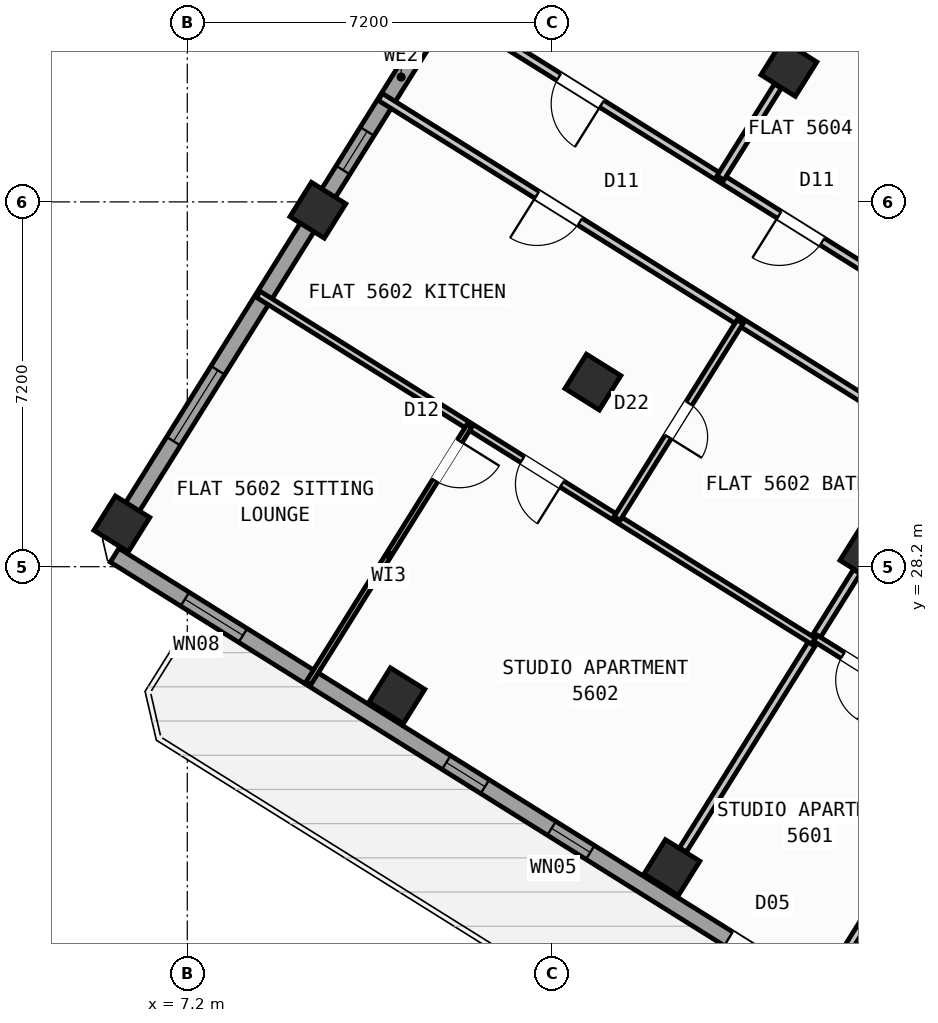
"""IFC4 building model, lengths in metres.
Left out: names, types, materials, properties, quantities, classifications, styles, units other than length and angle.
Written with IfcOpenShell. Run it as: python <this file> out.ifc"""

import sys

from ifc_helpers import new_model, si_unit, direction, frame, frame_2d, origin, origin_2d, place, context, subcontext, project, spatial, rectangle, hollow_rectangle, extrude, source, transform, mapped, element, fill, save


model = new_model("IFC4")
c1 = context("Model", 3, precision=1e-05, world=origin(), true_north=direction((0.0, 1.0)))
c2 = subcontext(c1, "Body", "Model", "MODEL_VIEW")
j1 = project(units=[si_unit("LENGTHUNIT", "METRE"), si_unit("PLANEANGLEUNIT", "RADIAN")], contexts=[c1])
p1 = place(None, origin())
s1 = spatial("IfcSite", under=j1, at=p1, CompositionType="ELEMENT")
p2 = place(p1, origin())
s2 = spatial("IfcBuilding", under=s1, at=p2, CompositionType="ELEMENT")
p3 = place(p2, frame((0.0, 0.0, 222.0)))
s3 = spatial("IfcBuildingStorey", under=s2, at=p3, CompositionType="ELEMENT", Elevation=222.0)
m1 = source(origin(), c2, "Body", "SweptSolid", [
    extrude(hollow_rectangle(XDim=0.8, YDim=0.8, WallThickness=0.032, at=origin_2d()), origin(), (0.0, 0.0, 1.0), 3.6),
])
for number, where, z_axis, x_axis in (
    (1, (20.632, 28.452, 0.0), (0.0, 0.0, 1.0), (-0.848, 0.53, 0.0)),
    (2, (16.764, 22.261, 0.0), (0.0, 0.0, 1.0), (-0.848, 0.53, 0.0)),
    (3, (19.073, 38.034, 0.0), (0.0, 0.0, 1.0), (-0.848, 0.53, 0.0)),
    (4, (15.205, 31.844, 0.0), (0.0, 0.0, 1.0), (-0.848, 0.53, 0.0)),
    (5, (11.336, 25.653, 0.0), (0.0, 0.0, 1.0), (-0.848, 0.53, 0.0)),
    (6, (9.777, 35.235, 0.0), (0.0, 0.0, 1.0), (-0.848, 0.53, 0.0)),
    (7, (5.909, 29.044, 0.0), (0.0, 0.0, 1.0), (-0.848, 0.53, 0.0)),
):
    element("IfcColumn", number, at=place(p3, frame(where, z_axis=z_axis, x_axis=x_axis)), inside=s3, PredefinedType="COLUMN", context=c2, shape_type="MappedRepresentation", body=[
        mapped(m1, transform((0.0, 0.0, 0.0), scale=1.0)),
    ])
p4 = place(p3, frame((31.76, 12.183, 0.0), z_axis=(0.0, 0.0, 1.0), x_axis=(-0.848047074256, 0.529920899612, 0.0)))
e8 = element("IfcWall", 8, at=p4, inside=s3, PredefinedType="STANDARD", context=c2, shape_type="SweptSolid", body=[
    extrude(rectangle(XDim=30.652, YDim=0.32, at=frame_2d((15.326, 0.0))), origin(), (0.0, 0.0, 1.0), 3.35),
])
p5 = place(p4, frame((15.166, 0.0, 0.0)))
e9 = element("IfcOpeningElement", 9, at=p5, cuts=e8, PredefinedType="OPENING", context=c2, shape_type="SweptSolid", body=[
    extrude(rectangle(XDim=1.2, YDim=2.15, at=frame_2d((0.6, 1.075))), frame((0.0, 0.17, 0.0), z_axis=(0.0, -1.0, 0.0), x_axis=(1.0, 0.0, 0.0)), (0.0, 0.0, 1.0), 0.34),
])
p6 = place(p4, frame((2.24, 0.0, 0.9)))
e10 = element("IfcOpeningElement", 10, at=p6, cuts=e8, PredefinedType="OPENING", context=c2, shape_type="SweptSolid", body=[
    extrude(rectangle(XDim=1.65, YDim=1.45, at=frame_2d((0.825, 0.725))), frame((0.0, 0.17, 0.0), z_axis=(0.0, -1.0, 0.0), x_axis=(1.0, 0.0, 0.0)), (0.0, 0.0, 1.0), 0.34),
])
p7 = place(p4, frame((7.469, 0.0, 0.9)))
e11 = element("IfcOpeningElement", 11, at=p7, cuts=e8, PredefinedType="OPENING", context=c2, shape_type="SweptSolid", body=[
    extrude(rectangle(XDim=1.65, YDim=1.45, at=frame_2d((0.825, 0.725))), frame((0.0, 0.17, 0.0), z_axis=(0.0, -1.0, 0.0), x_axis=(1.0, 0.0, 0.0)), (0.0, 0.0, 1.0), 0.34),
])
p8 = place(p4, frame((12.623, 0.0, 1.0)))
e12 = element("IfcOpeningElement", 12, at=p8, cuts=e8, PredefinedType="OPENING", context=c2, shape_type="SweptSolid", body=[
    extrude(rectangle(XDim=0.9, YDim=1.25, at=frame_2d((0.45, 0.625))), frame((0.0, 0.17, 0.0), z_axis=(0.0, -1.0, 0.0), x_axis=(1.0, 0.0, 0.0)), (0.0, 0.0, 1.0), 0.34),
])
p9 = place(p4, frame((19.583, 0.0, 1.0)))
e13 = element("IfcOpeningElement", 13, at=p9, cuts=e8, PredefinedType="OPENING", context=c2, shape_type="SweptSolid", body=[
    extrude(rectangle(XDim=0.9, YDim=1.25, at=frame_2d((0.45, 0.625))), frame((0.0, 0.17, 0.0), z_axis=(0.0, -1.0, 0.0), x_axis=(1.0, 0.0, 0.0)), (0.0, 0.0, 1.0), 0.34),
])
p10 = place(p4, frame((22.033, 0.0, 1.0)))
e14 = element("IfcOpeningElement", 14, at=p10, cuts=e8, PredefinedType="OPENING", context=c2, shape_type="SweptSolid", body=[
    extrude(rectangle(XDim=0.9, YDim=1.25, at=frame_2d((0.45, 0.625))), frame((0.0, 0.17, 0.0), z_axis=(0.0, -1.0, 0.0), x_axis=(1.0, 0.0, 0.0)), (0.0, 0.0, 1.0), 0.34),
])
p11 = place(p4, frame((27.666, 0.0, 0.9)))
e15 = element("IfcOpeningElement", 15, at=p11, cuts=e8, PredefinedType="OPENING", context=c2, shape_type="SweptSolid", body=[
    extrude(rectangle(XDim=1.35, YDim=1.45, at=frame_2d((0.675, 0.725))), frame((0.0, 0.17, 0.0), z_axis=(0.0, -1.0, 0.0), x_axis=(1.0, 0.0, 0.0)), (0.0, 0.0, 1.0), 0.34),
])
p12 = place(p3, frame((5.7, 28.71, 0.0), z_axis=(0.0, 0.0, 1.0), x_axis=(0.529923711467, 0.8480453172, 0.0)))
e16 = element("IfcWall", 16, at=p12, inside=s3, PredefinedType="STANDARD", context=c2, shape_type="SweptSolid", body=[
    extrude(rectangle(XDim=21.587, YDim=0.32, at=frame_2d((10.794, 0.0))), origin(), (0.0, 0.0, 1.0), 2.825),
])
p13 = place(p12, frame((2.319, 0.0, 0.9)))
e17 = element("IfcOpeningElement", 17, at=p13, cuts=e16, PredefinedType="OPENING", context=c2, shape_type="SweptSolid", body=[
    extrude(rectangle(XDim=1.65, YDim=1.45, at=frame_2d((0.825, 0.725))), frame((0.0, 0.17, 0.0), z_axis=(0.0, -1.0, 0.0), x_axis=(1.0, 0.0, 0.0)), (0.0, 0.0, 1.0), 0.34),
])
p14 = place(p12, frame((8.629, 0.0, 1.0)))
e18 = element("IfcOpeningElement", 18, at=p14, cuts=e16, PredefinedType="OPENING", context=c2, shape_type="SweptSolid", body=[
    extrude(rectangle(XDim=0.9, YDim=1.25, at=frame_2d((0.45, 0.625))), frame((0.0, 0.17, 0.0), z_axis=(0.0, -1.0, 0.0), x_axis=(1.0, 0.0, 0.0)), (0.0, 0.0, 1.0), 0.34),
])
p15 = place(p12, frame((13.159, 0.0, 1.0)))
e19 = element("IfcOpeningElement", 19, at=p15, cuts=e16, PredefinedType="OPENING", context=c2, shape_type="SweptSolid", body=[
    extrude(rectangle(XDim=0.9, YDim=1.25, at=frame_2d((0.45, 0.625))), frame((0.0, 0.17, 0.0), z_axis=(0.0, -1.0, 0.0), x_axis=(1.0, 0.0, 0.0)), (0.0, 0.0, 1.0), 0.34),
])
p16 = place(p12, frame((16.232, 0.0, 1.0)))
e20 = element("IfcOpeningElement", 20, at=p16, cuts=e16, PredefinedType="OPENING", context=c2, shape_type="SweptSolid", body=[
    extrude(rectangle(XDim=0.9, YDim=1.25, at=frame_2d((0.45, 0.625))), frame((0.0, 0.17, 0.0), z_axis=(0.0, -1.0, 0.0), x_axis=(1.0, 0.0, 0.0)), (0.0, 0.0, 1.0), 0.34),
])
p17 = place(p12, frame((18.925, 0.0, 0.9)))
e21 = element("IfcOpeningElement", 21, at=p17, cuts=e16, PredefinedType="OPENING", context=c2, shape_type="SweptSolid", body=[
    extrude(rectangle(XDim=1.35, YDim=1.45, at=frame_2d((0.675, 0.725))), frame((0.0, 0.17, 0.0), z_axis=(0.0, -1.0, 0.0), x_axis=(1.0, 0.0, 0.0)), (0.0, 0.0, 1.0), 0.34),
])
p18 = place(p3, frame((17.424, 47.083, 0.0), z_axis=(0.0, 0.0, 1.0), x_axis=(0.848049927979, -0.529916332693, 0.0)))
e22 = element("IfcWall", 22, at=p18, inside=s3, PredefinedType="STANDARD", context=c2, shape_type="SweptSolid", body=[
    extrude(rectangle(XDim=29.223, YDim=0.32, at=frame_2d((14.612, 0.0))), origin(), (0.0, 0.0, 1.0), 3.35),
])
p19 = place(p18, frame((3.77, 0.0, 0.0)))
e23 = element("IfcOpeningElement", 23, at=p19, cuts=e22, PredefinedType="OPENING", context=c2, shape_type="SweptSolid", body=[
    extrude(rectangle(XDim=1.05, YDim=2.15, at=frame_2d((0.525, 1.075))), frame((0.0, 0.17, 0.0), z_axis=(0.0, -1.0, 0.0), x_axis=(1.0, 0.0, 0.0)), (0.0, 0.0, 1.0), 0.34),
])
p20 = place(p18, frame((1.125, 0.0, 0.9)))
e24 = element("IfcOpeningElement", 24, at=p20, cuts=e22, PredefinedType="OPENING", context=c2, shape_type="SweptSolid", body=[
    extrude(rectangle(XDim=1.65, YDim=1.45, at=frame_2d((0.825, 0.725))), frame((0.0, 0.17, 0.0), z_axis=(0.0, -1.0, 0.0), x_axis=(1.0, 0.0, 0.0)), (0.0, 0.0, 1.0), 0.34),
])
p21 = place(p18, frame((7.384, 0.0, 0.9)))
e25 = element("IfcOpeningElement", 25, at=p21, cuts=e22, PredefinedType="OPENING", context=c2, shape_type="SweptSolid", body=[
    extrude(rectangle(XDim=1.35, YDim=1.45, at=frame_2d((0.675, 0.725))), frame((0.0, 0.17, 0.0), z_axis=(0.0, -1.0, 0.0), x_axis=(1.0, 0.0, 0.0)), (0.0, 0.0, 1.0), 0.34),
])
p22 = place(p18, frame((10.054, 0.0, 0.9)))
e26 = element("IfcOpeningElement", 26, at=p22, cuts=e22, PredefinedType="OPENING", context=c2, shape_type="SweptSolid", body=[
    extrude(rectangle(XDim=1.35, YDim=1.45, at=frame_2d((0.675, 0.725))), frame((0.0, 0.17, 0.0), z_axis=(0.0, -1.0, 0.0), x_axis=(1.0, 0.0, 0.0)), (0.0, 0.0, 1.0), 0.34),
])
p23 = place(p18, frame((14.039, 0.0, 1.0)))
e27 = element("IfcOpeningElement", 27, at=p23, cuts=e22, PredefinedType="OPENING", context=c2, shape_type="SweptSolid", body=[
    extrude(rectangle(XDim=0.9, YDim=1.25, at=frame_2d((0.45, 0.625))), frame((0.0, 0.17, 0.0), z_axis=(0.0, -1.0, 0.0), x_axis=(1.0, 0.0, 0.0)), (0.0, 0.0, 1.0), 0.34),
])
p24 = place(p18, frame((17.254, 0.0, 1.0)))
e28 = element("IfcOpeningElement", 28, at=p24, cuts=e22, PredefinedType="OPENING", context=c2, shape_type="SweptSolid", body=[
    extrude(rectangle(XDim=0.9, YDim=1.25, at=frame_2d((0.45, 0.625))), frame((0.0, 0.17, 0.0), z_axis=(0.0, -1.0, 0.0), x_axis=(1.0, 0.0, 0.0)), (0.0, 0.0, 1.0), 0.34),
])
p25 = place(p18, frame((20.161, 0.0, 0.9)))
e29 = element("IfcOpeningElement", 29, at=p25, cuts=e22, PredefinedType="OPENING", context=c2, shape_type="SweptSolid", body=[
    extrude(rectangle(XDim=1.35, YDim=1.45, at=frame_2d((0.675, 0.725))), frame((0.0, 0.17, 0.0), z_axis=(0.0, -1.0, 0.0), x_axis=(1.0, 0.0, 0.0)), (0.0, 0.0, 1.0), 0.34),
])
p26 = place(p18, frame((22.846, 0.0, 0.9)))
e30 = element("IfcOpeningElement", 30, at=p26, cuts=e22, PredefinedType="OPENING", context=c2, shape_type="SweptSolid", body=[
    extrude(rectangle(XDim=1.35, YDim=1.45, at=frame_2d((0.675, 0.725))), frame((0.0, 0.17, 0.0), z_axis=(0.0, -1.0, 0.0), x_axis=(1.0, 0.0, 0.0)), (0.0, 0.0, 1.0), 0.34),
])
p27 = place(p18, frame((26.898, 0.0, 1.0)))
e31 = element("IfcOpeningElement", 31, at=p27, cuts=e22, PredefinedType="OPENING", context=c2, shape_type="SweptSolid", body=[
    extrude(rectangle(XDim=0.9, YDim=1.25, at=frame_2d((0.45, 0.625))), frame((0.0, 0.17, 0.0), z_axis=(0.0, -1.0, 0.0), x_axis=(1.0, 0.0, 0.0)), (0.0, 0.0, 1.0), 0.34),
])
p28 = place(p3, frame((25.198, 28.606, 0.0), z_axis=(0.0, 0.0, 1.0), x_axis=(-0.529926497642, -0.848043576178, 0.0)))
e32 = element("IfcWall", 32, at=p28, inside=s3, PredefinedType="PARTITIONING", context=c2, shape_type="SweptSolid", body=[
    extrude(rectangle(XDim=10.3, YDim=0.16, at=frame_2d((5.15, 0.0))), origin(), (0.0, 0.0, 1.0), 3.34),
])
p29 = place(p3, frame((26.363, 30.472, 0.0), z_axis=(0.0, 0.0, 1.0), x_axis=(-0.848052408131, 0.529912363569, 0.0)))
e33 = element("IfcWall", 33, at=p29, inside=s3, PredefinedType="PARTITIONING", context=c2, shape_type="SweptSolid", body=[
    extrude(rectangle(XDim=16.73, YDim=0.16, at=frame_2d((8.365, 0.0))), origin(), (0.0, 0.0, 1.0), 3.34),
])
p30 = place(p29, frame((2.22, 0.0, 0.0)))
e34 = element("IfcOpeningElement", 34, at=p30, cuts=e33, PredefinedType="OPENING", context=c2, shape_type="SweptSolid", body=[
    extrude(rectangle(XDim=0.86, YDim=2.05, at=frame_2d((0.43, 1.025))), frame((0.0, 0.09, 0.0), z_axis=(0.0, -1.0, 0.0), x_axis=(1.0, 0.0, 0.0)), (0.0, 0.0, 1.0), 0.18),
])
p31 = place(p29, frame((7.82, 0.0, 0.0)))
e35 = element("IfcOpeningElement", 35, at=p31, cuts=e33, PredefinedType="OPENING", context=c2, shape_type="SweptSolid", body=[
    extrude(rectangle(XDim=1.0, YDim=2.1, at=frame_2d((0.5, 1.05))), frame((0.0, 0.09, 0.0), z_axis=(0.0, -1.0, 0.0), x_axis=(1.0, 0.0, 0.0)), (0.0, 0.0, 1.0), 0.18),
])
p32 = place(p29, frame((12.95, 0.0, 0.0)))
e36 = element("IfcOpeningElement", 36, at=p32, cuts=e33, PredefinedType="OPENING", context=c2, shape_type="SweptSolid", body=[
    extrude(rectangle(XDim=1.0, YDim=2.1, at=frame_2d((0.5, 1.05))), frame((0.0, 0.09, 0.0), z_axis=(0.0, -1.0, 0.0), x_axis=(1.0, 0.0, 0.0)), (0.0, 0.0, 1.0), 0.18),
])
p33 = place(p3, frame((25.198, 28.606, 0.0), z_axis=(0.0, 0.0, 1.0), x_axis=(-0.848052408131, 0.529912363569, 0.0)))
e37 = element("IfcWall", 37, at=p33, inside=s3, PredefinedType="PARTITIONING", context=c2, shape_type="SweptSolid", body=[
    extrude(rectangle(XDim=16.73, YDim=0.16, at=frame_2d((8.365, 0.0))), origin(), (0.0, 0.0, 1.0), 3.34),
])
p34 = place(p33, frame((2.22, 0.0, 0.0)))
e38 = element("IfcOpeningElement", 38, at=p34, cuts=e37, PredefinedType="OPENING", context=c2, shape_type="SweptSolid", body=[
    extrude(rectangle(XDim=0.86, YDim=2.05, at=frame_2d((0.43, 1.025))), frame((0.0, 0.09, 0.0), z_axis=(0.0, -1.0, 0.0), x_axis=(1.0, 0.0, 0.0)), (0.0, 0.0, 1.0), 0.18),
])
p35 = place(p33, frame((12.084, 0.0, 0.0)))
e39 = element("IfcOpeningElement", 39, at=p35, cuts=e37, PredefinedType="OPENING", context=c2, shape_type="SweptSolid", body=[
    extrude(rectangle(XDim=1.0, YDim=2.1, at=frame_2d((0.5, 1.05))), frame((0.0, 0.09, 0.0), z_axis=(0.0, -1.0, 0.0), x_axis=(1.0, 0.0, 0.0)), (0.0, 0.0, 1.0), 0.18),
])
p36 = place(p3, frame((20.414, 28.103, 0.0), z_axis=(0.0, 0.0, 1.0), x_axis=(-0.529934553702, -0.848038542045, 0.0)))
e40 = element("IfcWall", 40, at=p36, inside=s3, PredefinedType="PARTITIONING", context=c2, shape_type="SweptSolid", body=[
    extrude(rectangle(XDim=6.476, YDim=0.16, at=frame_2d((3.238, 0.0))), origin(), (0.0, 0.0, 1.0), 2.825),
])
p37 = place(p3, frame((22.807, 24.781, 0.0), z_axis=(0.0, 0.0, 1.0), x_axis=(-0.84803087207, 0.529946827537, 0.0)))
e41 = element("IfcWall", 41, at=p37, inside=s3, PredefinedType="PLUMBINGWALL", context=c2, shape_type="SweptSolid", body=[
    extrude(rectangle(XDim=3.79, YDim=0.14, at=frame_2d((1.895, 0.0))), origin(), (0.0, 0.0, 1.0), 3.34),
])
p38 = place(p37, frame((2.23, 0.0, 0.0)))
e42 = element("IfcOpeningElement", 42, at=p38, cuts=e41, PredefinedType="OPENING", context=c2, shape_type="SweptSolid", body=[
    extrude(rectangle(XDim=0.92, YDim=2.08, at=frame_2d((0.46, 1.04))), frame((0.0, 0.08, 0.0), z_axis=(0.0, -1.0, 0.0), x_axis=(1.0, 0.0, 0.0)), (0.0, 0.0, 1.0), 0.16),
])
p39 = place(p3, frame((19.556, 26.73, 0.0), z_axis=(0.0, 0.0, 1.0), x_axis=(-0.848043949058, 0.52992590092, 0.0)))
e43 = element("IfcWall", 43, at=p39, inside=s3, PredefinedType="PLUMBINGWALL", context=c2, shape_type="SweptSolid", body=[
    extrude(rectangle(XDim=12.92, YDim=0.14, at=frame_2d((6.46, 0.0))), origin(), (0.0, 0.0, 1.0), 3.34),
])
p40 = place(p39, frame((5.849, 0.0, 0.0)))
e44 = element("IfcOpeningElement", 44, at=p40, cuts=e43, PredefinedType="OPENING", context=c2, shape_type="SweptSolid", body=[
    extrude(rectangle(XDim=0.92, YDim=2.08, at=frame_2d((0.46, 1.04))), frame((0.0, 0.08, 0.0), z_axis=(0.0, -1.0, 0.0), x_axis=(1.0, 0.0, 0.0)), (0.0, 0.0, 1.0), 0.16),
])
p41 = place(p3, frame((18.109, 33.035, 0.0), z_axis=(0.0, 0.0, 1.0), x_axis=(-0.529893526057, -0.848064178611, 0.0)))
e45 = element("IfcWall", 45, at=p41, inside=s3, PredefinedType="PLUMBINGWALL", context=c2, shape_type="SweptSolid", body=[
    extrude(rectangle(XDim=4.58, YDim=0.14, at=frame_2d((2.29, 0.0))), origin(), (0.0, 0.0, 1.0), 3.34),
])
p42 = place(p41, frame((1.9, 0.0, 0.0)))
e46 = element("IfcOpeningElement", 46, at=p42, cuts=e45, PredefinedType="OPENING", context=c2, shape_type="SweptSolid", body=[
    extrude(rectangle(XDim=0.78, YDim=2.05, at=frame_2d((0.39, 1.025))), frame((0.0, 0.08, 0.0), z_axis=(0.0, -1.0, 0.0), x_axis=(1.0, 0.0, 0.0)), (0.0, 0.0, 1.0), 0.16),
])
p43 = place(p3, frame((12.763, 30.975, 0.0), z_axis=(0.0, 0.0, 1.0), x_axis=(-0.529947646893, -0.848030360042, 0.0)))
e47 = element("IfcWall", 47, at=p43, inside=s3, PredefinedType="PARTITIONING", context=c2, shape_type="SweptSolid", body=[
    extrude(rectangle(XDim=5.99, YDim=0.11, at=frame_2d((2.995, 0.0))), origin(), (0.0, 0.0, 1.0), 3.34),
])
p44 = place(p43, frame((0.35, 0.0, 0.0)))
e48 = element("IfcOpeningElement", 48, at=p44, cuts=e47, PredefinedType="OPENING", context=c2, shape_type="SweptSolid", body=[
    extrude(rectangle(XDim=0.92, YDim=2.08, at=frame_2d((0.46, 1.04))), frame((0.0, 0.065, 0.0), z_axis=(0.0, -1.0, 0.0), x_axis=(1.0, 0.0, 0.0)), (0.0, 0.0, 1.0), 0.13),
])
p45 = place(p3, frame((22.206, 43.049, 0.0), z_axis=(0.0, 0.0, 1.0), x_axis=(-0.529919150083, -0.848048167486, 0.0)))
e49 = element("IfcWall", 49, at=p45, inside=s3, PredefinedType="PARTITIONING", context=c2, shape_type="SweptSolid", body=[
    extrude(rectangle(XDim=5.501, YDim=0.16, at=frame_2d((2.75, 0.0))), origin(), (0.0, 0.0, 1.0), 2.825),
])
p46 = place(p3, frame((18.854, 37.685, 0.0), z_axis=(0.0, 0.0, 1.0), x_axis=(-0.52989628283, -0.848062456098, 0.0)))
e50 = element("IfcWall", 50, at=p46, inside=s3, PredefinedType="PARTITIONING", context=c2, shape_type="SweptSolid", body=[
    extrude(rectangle(XDim=2.138, YDim=0.16, at=frame_2d((1.069, 0.0))), origin(), (0.0, 0.0, 1.0), 2.825),
])
p47 = place(p3, frame((25.576, 36.365, 0.0), z_axis=(0.0, 0.0, 1.0), x_axis=(-0.848056163074, 0.529906354247, 0.0)))
e51 = element("IfcWall", 51, at=p47, inside=s3, PredefinedType="PLUMBINGWALL", context=c2, shape_type="SweptSolid", body=[
    extrude(rectangle(XDim=6.4, YDim=0.14, at=frame_2d((3.2, 0.0))), origin(), (0.0, 0.0, 1.0), 3.34),
])
p48 = place(p47, frame((4.04, 0.0, 0.0)))
e52 = element("IfcOpeningElement", 52, at=p48, cuts=e51, PredefinedType="OPENING", context=c2, shape_type="SweptSolid", body=[
    extrude(rectangle(XDim=0.92, YDim=2.08, at=frame_2d((0.46, 1.04))), frame((0.0, 0.08, 0.0), z_axis=(0.0, -1.0, 0.0), x_axis=(1.0, 0.0, 0.0)), (0.0, 0.0, 1.0), 0.16),
])
m2 = source(origin(), c2, "Body", "SweptSolid", [
    extrude(rectangle(XDim=1.2, YDim=2.15, at=frame_2d((0.6, 1.075))), frame((0.0, 0.025, 0.0), z_axis=(0.0, -1.0, 0.0), x_axis=(1.0, 0.0, 0.0)), (0.0, 0.0, 1.0), 0.05),
])
p49 = place(p5, origin())
e53 = element("IfcDoor", 53, at=p49, inside=s3, OperationType="SINGLE_SWING_LEFT", PredefinedType="DOOR", context=c2, shape_type="MappedRepresentation", body=[
    mapped(m2, transform((0.0, 0.0, 0.0), scale=1.0)),
])
fill(e9, e53)
m3 = source(origin(), c2, "Body", "SweptSolid", [
    extrude(rectangle(XDim=0.9, YDim=1.25, at=frame_2d((0.45, 0.625))), frame((0.0, 0.03, 0.0), z_axis=(0.0, -1.0, 0.0), x_axis=(1.0, 0.0, 0.0)), (0.0, 0.0, 1.0), 0.06),
])
p50 = place(p9, origin())
e54 = element("IfcWindow", 54, at=p50, inside=s3, PartitioningType="SINGLE_PANEL", PredefinedType="WINDOW", context=c2, shape_type="MappedRepresentation", body=[
    mapped(m3, transform((0.0, 0.0, 0.0), scale=1.0)),
])
fill(e13, e54)
p51 = place(p10, origin())
e55 = element("IfcWindow", 55, at=p51, inside=s3, PartitioningType="SINGLE_PANEL", PredefinedType="WINDOW", context=c2, shape_type="MappedRepresentation", body=[
    mapped(m3, transform((0.0, 0.0, 0.0), scale=1.0)),
])
fill(e14, e55)
m4 = source(origin(), c2, "Body", "SweptSolid", [
    extrude(rectangle(XDim=1.35, YDim=1.45, at=frame_2d((0.675, 0.725))), frame((0.0, 0.03, 0.0), z_axis=(0.0, -1.0, 0.0), x_axis=(1.0, 0.0, 0.0)), (0.0, 0.0, 1.0), 0.06),
])
p52 = place(p11, origin())
e56 = element("IfcWindow", 56, at=p52, inside=s3, PartitioningType="SINGLE_PANEL", PredefinedType="WINDOW", context=c2, shape_type="MappedRepresentation", body=[
    mapped(m4, transform((0.0, 0.0, 0.0), scale=1.0)),
])
fill(e15, e56)
m5 = source(origin(), c2, "Body", "SweptSolid", [
    extrude(rectangle(XDim=1.65, YDim=1.45, at=frame_2d((0.825, 0.725))), frame((0.0, 0.03, 0.0), z_axis=(0.0, -1.0, 0.0), x_axis=(1.0, 0.0, 0.0)), (0.0, 0.0, 1.0), 0.06),
])
p53 = place(p13, origin())
e57 = element("IfcWindow", 57, at=p53, inside=s3, PartitioningType="SINGLE_PANEL", PredefinedType="WINDOW", context=c2, shape_type="MappedRepresentation", body=[
    mapped(m5, transform((0.0, 0.0, 0.0), scale=1.0)),
])
fill(e17, e57)
p54 = place(p14, origin())
e58 = element("IfcWindow", 58, at=p54, inside=s3, PartitioningType="SINGLE_PANEL", PredefinedType="WINDOW", context=c2, shape_type="MappedRepresentation", body=[
    mapped(m3, transform((0.0, 0.0, 0.0), scale=1.0)),
])
fill(e18, e58)
m6 = source(origin(), c2, "Body", "SweptSolid", [
    extrude(rectangle(XDim=0.92, YDim=2.08, at=frame_2d((0.46, 1.04))), frame((0.0, 0.025, 0.0), z_axis=(0.0, -1.0, 0.0), x_axis=(1.0, 0.0, 0.0)), (0.0, 0.0, 1.0), 0.05),
])
p55 = place(p38, origin())
e59 = element("IfcDoor", 59, at=p55, inside=s3, OperationType="SINGLE_SWING_LEFT", PredefinedType="DOOR", context=c2, shape_type="MappedRepresentation", body=[
    mapped(m6, transform((0.0, 0.0, 0.0), scale=1.0)),
])
fill(e42, e59)
p56 = place(p44, origin())
e60 = element("IfcDoor", 60, at=p56, inside=s3, OperationType="SINGLE_SWING_LEFT", PredefinedType="DOOR", context=c2, shape_type="MappedRepresentation", body=[
    mapped(m6, transform((0.0, 0.0, 0.0), scale=1.0)),
])
fill(e48, e60)
m7 = source(origin(), c2, "Body", "SweptSolid", [
    extrude(rectangle(XDim=1.0, YDim=2.1, at=frame_2d((0.5, 1.05))), frame((0.0, 0.025, 0.0), z_axis=(0.0, -1.0, 0.0), x_axis=(1.0, 0.0, 0.0)), (0.0, 0.0, 1.0), 0.05),
])
p57 = place(p35, origin())
e61 = element("IfcDoor", 61, at=p57, inside=s3, OperationType="SINGLE_SWING_RIGHT", PredefinedType="DOOR", context=c2, shape_type="MappedRepresentation", body=[
    mapped(m7, transform((0.0, 0.0, 0.0), scale=1.0)),
])
fill(e39, e61)
p58 = place(p40, origin())
e62 = element("IfcDoor", 62, at=p58, inside=s3, OperationType="SINGLE_SWING_LEFT", PredefinedType="DOOR", context=c2, shape_type="MappedRepresentation", body=[
    mapped(m6, transform((0.0, 0.0, 0.0), scale=1.0)),
])
fill(e44, e62)
m8 = source(origin(), c2, "Body", "SweptSolid", [
    extrude(rectangle(XDim=0.78, YDim=2.05, at=frame_2d((0.39, 1.025))), frame((0.0, 0.025, 0.0), z_axis=(0.0, -1.0, 0.0), x_axis=(1.0, 0.0, 0.0)), (0.0, 0.0, 1.0), 0.05),
])
p59 = place(p42, origin())
e63 = element("IfcDoor", 63, at=p59, inside=s3, OperationType="SINGLE_SWING_RIGHT", PredefinedType="DOOR", context=c2, shape_type="MappedRepresentation", body=[
    mapped(m8, transform((0.0, 0.0, 0.0), scale=1.0)),
])
fill(e46, e63)
p60 = place(p31, origin())
e64 = element("IfcDoor", 64, at=p60, inside=s3, OperationType="SINGLE_SWING_RIGHT", PredefinedType="DOOR", context=c2, shape_type="MappedRepresentation", body=[
    mapped(m7, transform((0.0, 0.0, 0.0), scale=1.0)),
])
fill(e35, e64)
p61 = place(p32, origin())
e65 = element("IfcDoor", 65, at=p61, inside=s3, OperationType="SINGLE_SWING_LEFT", PredefinedType="DOOR", context=c2, shape_type="MappedRepresentation", body=[
    mapped(m7, transform((0.0, 0.0, 0.0), scale=1.0)),
])
fill(e36, e65)
save(model, sys.argv[1])
